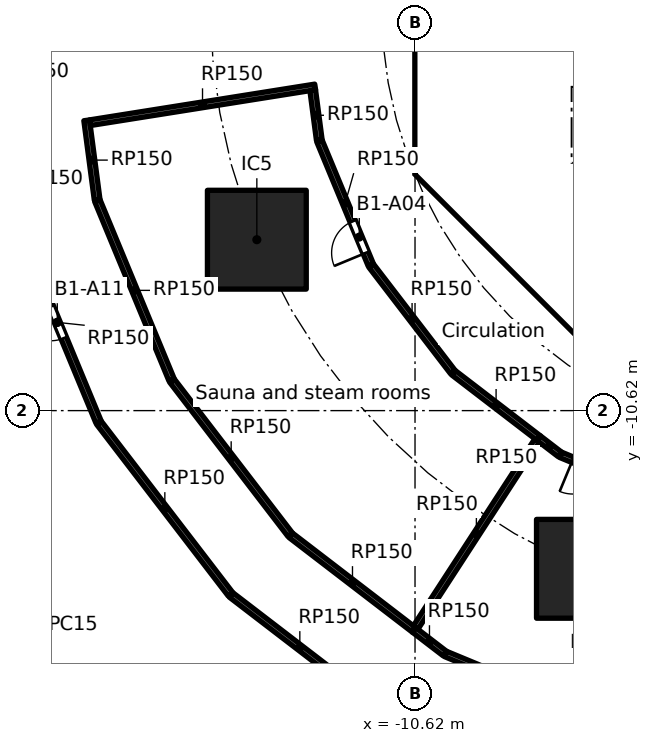
"""IFC4 building model, lengths in metres.
Left out: names, types, materials, properties, quantities, classifications, styles, units other than length and angle.
Written with IfcOpenShell. Run it as: python <this file> out.ifc"""

import sys

from ifc_helpers import new_model, si_unit, direction, frame, frame_2d, origin, origin_2d, place, context, subcontext, project, spatial, polyline, rectangle, outline, extrude, element, fill, save


model = new_model("IFC4")
c1 = context("Model", 3, precision=1e-05, world=origin(), true_north=direction((0.0, 1.0)))
c2 = subcontext(c1, "Body", "Model", "MODEL_VIEW")
j1 = project(units=[si_unit("LENGTHUNIT", "METRE"), si_unit("PLANEANGLEUNIT", "RADIAN")], contexts=[c1])
p1 = place(None, origin())
s1 = spatial("IfcSite", under=j1, at=p1, CompositionType="ELEMENT")
p2 = place(p1, origin())
s2 = spatial("IfcBuilding", under=s1, at=p2, CompositionType="ELEMENT")
p3 = place(p2, frame((0.0, 0.0, -5.0)))
s3 = spatial("IfcBuildingStorey", under=s2, at=p3, CompositionType="ELEMENT", Elevation=-5.0)
for number, where, z_axis, x_axis in (
    (1, (-14.782, -6.123, 0.0), (0.0, 0.0, 1.0), (1.0, 0.0, 0.0)),
    (2, (-6.123, -14.782, 0.0), (0.0, 0.0, 1.0), (1.0, 0.0, 0.0)),
):
    element("IfcColumn", number, at=place(p3, frame(where, z_axis=z_axis, x_axis=x_axis)), inside=s3, PredefinedType="COLUMN", context=c2, shape_type="SweptSolid", body=[
        extrude(rectangle(XDim=2.6, YDim=2.6, at=origin_2d()), origin(), (0.0, 0.0, 1.0), 5.0),
    ])
p4 = place(p3, frame((-10.325, 3.801, 0.0), z_axis=(0.0, 0.0, 1.0), x_axis=(0.0, -1.0, 0.0)))
e3 = element("IfcWall", 3, at=p4, inside=s3, PredefinedType="SHEAR", context=c2, shape_type="SweptSolid", body=[
    extrude(rectangle(XDim=7.602, YDim=0.6, at=frame_2d((3.801, 0.0))), origin(), (0.0, 0.0, 1.0), 4.6),
])
p5 = place(p4, frame((0.651, 0.0, 0.0)))
e4 = element("IfcOpeningElement", 4, at=p5, cuts=e3, PredefinedType="OPENING", context=c2, shape_type="SweptSolid", body=[
    extrude(rectangle(XDim=1.5, YDim=2.1, at=frame_2d((0.75, 1.05))), frame((0.0, 0.31, 0.0), z_axis=(0.0, -1.0, 0.0), x_axis=(1.0, 0.0, 0.0)), (0.0, 0.0, 1.0), 0.62),
])
p6 = place(p4, frame((5.451, 0.0, 0.0)))
e5 = element("IfcOpeningElement", 5, at=p6, cuts=e3, PredefinedType="OPENING", context=c2, shape_type="SweptSolid", body=[
    extrude(rectangle(XDim=1.5, YDim=2.1, at=frame_2d((0.75, 1.05))), frame((0.0, 0.31, 0.0), z_axis=(0.0, -1.0, 0.0), x_axis=(1.0, 0.0, 0.0)), (0.0, 0.0, 1.0), 0.62),
])
p7 = place(p3, frame((-9.988, -4.613, 0.0), z_axis=(0.0, 0.0, 1.0), x_axis=(0.707106781187, -0.707106781187, 0.0)))
e6 = element("IfcWall", 6, at=p7, inside=s3, PredefinedType="SHEAR", context=c2, shape_type="SweptSolid", body=[
    extrude(rectangle(XDim=7.602, YDim=0.6, at=frame_2d((3.801, 0.0))), origin(), (0.0, 0.0, 1.0), 4.6),
])
p8 = place(p7, frame((6.151, 0.0, 0.0)))
e7 = element("IfcOpeningElement", 7, at=p8, cuts=e6, PredefinedType="OPENING", context=c2, shape_type="SweptSolid", body=[
    extrude(rectangle(XDim=1.1, YDim=2.1, at=frame_2d((0.55, 1.05))), frame((0.0, 0.31, 0.0), z_axis=(0.0, -1.0, 0.0), x_axis=(1.0, 0.0, 0.0)), (0.0, 0.0, 1.0), 0.62),
])
p9 = place(p3, frame((-6.7, -2.0, 0.0), z_axis=(0.0, 0.0, 1.0), x_axis=(1.0, 0.0, 0.0)))
e8 = element("IfcWall", 8, at=p9, inside=s3, PredefinedType="SOLIDWALL", context=c2, shape_type="SweptSolid", body=[
    extrude(rectangle(XDim=13.4, YDim=0.2, at=frame_2d((6.7, 0.0))), origin(), (0.0, 0.0, 1.0), 4.6),
])
p10 = place(p9, frame((0.65, 0.0, 0.0)))
e9 = element("IfcOpeningElement", 9, at=p10, cuts=e8, PredefinedType="OPENING", context=c2, shape_type="SweptSolid", body=[
    extrude(rectangle(XDim=1.1, YDim=2.1, at=frame_2d((0.55, 1.05))), frame((0.0, 0.11, 0.0), z_axis=(0.0, -1.0, 0.0), x_axis=(1.0, 0.0, 0.0)), (0.0, 0.0, 1.0), 0.22),
])
p11 = place(p9, frame((2.85, 0.0, 0.0)))
e10 = element("IfcOpeningElement", 10, at=p11, cuts=e8, PredefinedType="OPENING", context=c2, shape_type="SweptSolid", body=[
    extrude(rectangle(XDim=1.1, YDim=2.1, at=frame_2d((0.55, 1.05))), frame((0.0, 0.11, 0.0), z_axis=(0.0, -1.0, 0.0), x_axis=(1.0, 0.0, 0.0)), (0.0, 0.0, 1.0), 0.22),
])
p12 = place(p9, frame((5.05, 0.0, 0.0)))
e11 = element("IfcOpeningElement", 11, at=p12, cuts=e8, PredefinedType="OPENING", context=c2, shape_type="SweptSolid", body=[
    extrude(rectangle(XDim=1.1, YDim=2.1, at=frame_2d((0.55, 1.05))), frame((0.0, 0.11, 0.0), z_axis=(0.0, -1.0, 0.0), x_axis=(1.0, 0.0, 0.0)), (0.0, 0.0, 1.0), 0.22),
])
p13 = place(p9, frame((7.25, 0.0, 0.0)))
e12 = element("IfcOpeningElement", 12, at=p13, cuts=e8, PredefinedType="OPENING", context=c2, shape_type="SweptSolid", body=[
    extrude(rectangle(XDim=1.1, YDim=2.1, at=frame_2d((0.55, 1.05))), frame((0.0, 0.11, 0.0), z_axis=(0.0, -1.0, 0.0), x_axis=(1.0, 0.0, 0.0)), (0.0, 0.0, 1.0), 0.22),
])
p14 = place(p9, frame((9.45, 0.0, 0.0)))
e13 = element("IfcOpeningElement", 13, at=p14, cuts=e8, PredefinedType="OPENING", context=c2, shape_type="SweptSolid", body=[
    extrude(rectangle(XDim=1.1, YDim=2.1, at=frame_2d((0.55, 1.05))), frame((0.0, 0.11, 0.0), z_axis=(0.0, -1.0, 0.0), x_axis=(1.0, 0.0, 0.0)), (0.0, 0.0, 1.0), 0.22),
])
p15 = place(p9, frame((11.65, 0.0, 0.0)))
e14 = element("IfcOpeningElement", 14, at=p15, cuts=e8, PredefinedType="OPENING", context=c2, shape_type="SweptSolid", body=[
    extrude(rectangle(XDim=1.1, YDim=2.1, at=frame_2d((0.55, 1.05))), frame((0.0, 0.11, 0.0), z_axis=(0.0, -1.0, 0.0), x_axis=(1.0, 0.0, 0.0)), (0.0, 0.0, 1.0), 0.22),
])
p16 = place(p3, origin())
e15 = element("IfcWall", 15, at=p16, inside=s3, PredefinedType="SHEAR", context=c2, shape_type="SweptSolid", body=[
    extrude(outline(polyline([(-10.625, -3.801), (-10.025, -3.801), (-10.025, -4.152), (-9.776, -4.401), (-10.2, -4.825), (-10.625, -4.401), (-10.625, -3.801)])), origin(), (0.0, 0.0, 1.0), 4.6),
])
p17 = place(p3, origin())
e16 = element("IfcWall", 16, at=p17, inside=s3, PredefinedType="SOLIDWALL", context=c2, shape_type="SweptSolid", body=[
    extrude(outline(polyline([(-6.7, -2.1), (-6.5, -2.1), (-6.5, -4.1), (-4.5, -4.1), (-4.5, -2.1), (-4.3, -2.1), (-4.3, -4.1), (-2.3, -4.1), (-2.3, -2.1), (-2.1, -2.1), (-2.1, -4.1), (-0.1, -4.1), (-0.1, -2.1), (0.1, -2.1), (0.1, -4.1), (2.1, -4.1), (2.1, -2.1), (2.3, -2.1), (2.3, -4.1), (4.3, -4.1), (4.3, -2.1), (4.5, -2.1), (4.5, -4.1), (6.5, -4.1), (6.5, -2.1), (6.7, -2.1), (6.7, -4.3), (-6.7, -4.3), (-6.7, -2.1)])), origin(), (0.0, 0.0, 1.0), 4.6),
])
p18 = place(p3, frame((-10.025, -4.0, 0.0), z_axis=(0.0, 0.0, 1.0), x_axis=(1.0, 0.0, 0.0)))
e17 = element("IfcWall", 17, at=p18, inside=s3, PredefinedType="PARTITIONING", context=c2, shape_type="SweptSolid", body=[
    extrude(rectangle(XDim=3.325, YDim=0.2, at=frame_2d((1.662, 0.0))), origin(), (0.0, 0.0, 1.0), 4.6),
])
p19 = place(p3, frame((-8.001, -6.1, 0.0), z_axis=(0.0, 0.0, 1.0), x_axis=(1.0, 0.0, 0.0)))
e18 = element("IfcWall", 18, at=p19, inside=s3, PredefinedType="PARTITIONING", context=c2, shape_type="SweptSolid", body=[
    extrude(rectangle(XDim=2.126, YDim=0.15, at=frame_2d((1.063, 0.0))), origin(), (0.0, 0.0, 1.0), 4.6),
])
p20 = place(p3, frame((-19.259, -2.982, 0.0), z_axis=(0.0, 0.0, 1.0), x_axis=(0.130625106848, -0.991431833996, 0.0)))
e19 = element("IfcWall", 19, at=p20, inside=s3, PredefinedType="PARTITIONING", context=c2, shape_type="SweptSolid", body=[
    extrude(rectangle(XDim=2.11, YDim=0.15, at=frame_2d((1.055, 0.0))), origin(), (0.0, 0.0, 1.0), 4.6),
])
p21 = place(p3, frame((-18.978, -5.097, 0.0), z_axis=(0.0, 0.0, 1.0), x_axis=(0.382672704618, -0.923883976017, 0.0)))
e20 = element("IfcWall", 20, at=p21, inside=s3, PredefinedType="PARTITIONING", context=c2, shape_type="SweptSolid", body=[
    extrude(rectangle(XDim=5.106, YDim=0.15, at=frame_2d((2.553, 0.0))), origin(), (0.0, 0.0, 1.0), 4.6),
])
p22 = place(p3, frame((-18.945, -10.924, 0.0), z_axis=(0.0, 0.0, 1.0), x_axis=(-0.38269058712, 0.923876568882, 0.0)))
e21 = element("IfcWall", 21, at=p22, inside=s3, PredefinedType="PARTITIONING", context=c2, shape_type="SweptSolid", body=[
    extrude(rectangle(XDim=5.686, YDim=0.15, at=frame_2d((2.843, 0.0))), origin(), (0.0, 0.0, 1.0), 4.6),
])
p23 = place(p22, frame((2.393, 0.0, 0.0)))
e22 = element("IfcOpeningElement", 22, at=p23, cuts=e21, PredefinedType="OPENING", context=c2, shape_type="SweptSolid", body=[
    extrude(rectangle(XDim=0.9, YDim=2.1, at=frame_2d((0.45, 1.05))), frame((0.0, 0.085, 0.0), z_axis=(0.0, -1.0, 0.0), x_axis=(1.0, 0.0, 0.0)), (0.0, 0.0, 1.0), 0.17),
])
p24 = place(p3, frame((-17.012, -9.835, 0.0), z_axis=(0.0, 0.0, 1.0), x_axis=(0.608760705644, -0.793353895348, 0.0)))
e23 = element("IfcWall", 23, at=p24, inside=s3, PredefinedType="PARTITIONING", context=c2, shape_type="SweptSolid", body=[
    extrude(rectangle(XDim=5.106, YDim=0.15, at=frame_2d((2.553, 0.0))), origin(), (0.0, 0.0, 1.0), 4.6),
])
p25 = place(p3, frame((-15.472, -15.456, 0.0), z_axis=(0.0, 0.0, 1.0), x_axis=(-0.608757822828, 0.793356107398, 0.0)))
e24 = element("IfcWall", 24, at=p25, inside=s3, PredefinedType="PARTITIONING", context=c2, shape_type="SweptSolid", body=[
    extrude(rectangle(XDim=5.686, YDim=0.15, at=frame_2d((2.843, 0.0))), origin(), (0.0, 0.0, 1.0), 4.6),
])
p26 = place(p3, frame((-13.886, -13.903, 0.0), z_axis=(0.0, 0.0, 1.0), x_axis=(0.793356294792, -0.608757578609, 0.0)))
e25 = element("IfcWall", 25, at=p26, inside=s3, PredefinedType="PARTITIONING", context=c2, shape_type="SweptSolid", body=[
    extrude(rectangle(XDim=4.087, YDim=0.15, at=frame_2d((2.043, 0.0))), origin(), (0.0, 0.0, 1.0), 4.6),
])
p27 = place(p3, frame((-13.247, -2.104, 0.0), z_axis=(0.0, 0.0, 1.0), x_axis=(-0.98762373009, -0.156841855905, 0.0)))
e26 = element("IfcWall", 26, at=p27, inside=s3, PredefinedType="PARTITIONING", context=c2, shape_type="SweptSolid", body=[
    extrude(rectangle(XDim=6.002, YDim=0.15, at=frame_2d((3.001, 0.0))), origin(), (0.0, 0.0, 1.0), 4.6),
])
p28 = place(p3, frame((-13.138, -3.508, 0.0), z_axis=(0.0, 0.0, 1.0), x_axis=(-0.130563767128, 0.991439913819, 0.0)))
e27 = element("IfcWall", 27, at=p28, inside=s3, PredefinedType="PARTITIONING", context=c2, shape_type="SweptSolid", body=[
    extrude(rectangle(XDim=1.33, YDim=0.15, at=frame_2d((0.665, 0.0))), origin(), (0.0, 0.0, 1.0), 4.6),
])
p29 = place(p3, frame((-11.846, -18.242, 0.0), z_axis=(0.0, 0.0, 1.0), x_axis=(-0.793357543816, 0.608755950829, 0.0)))
e28 = element("IfcWall", 28, at=p29, inside=s3, PredefinedType="PARTITIONING", context=c2, shape_type="SweptSolid", body=[
    extrude(rectangle(XDim=4.55, YDim=0.15, at=frame_2d((2.275, 0.0))), origin(), (0.0, 0.0, 1.0), 4.6),
])
p30 = place(p3, frame((-11.782, -6.789, 0.0), z_axis=(0.0, 0.0, 1.0), x_axis=(-0.382677866108, 0.923881838111, 0.0)))
e29 = element("IfcWall", 29, at=p30, inside=s3, PredefinedType="PARTITIONING", context=c2, shape_type="SweptSolid", body=[
    extrude(rectangle(XDim=3.527, YDim=0.15, at=frame_2d((1.763, 0.0))), origin(), (0.0, 0.0, 1.0), 4.6),
])
p31 = place(p30, frame((0.346, 0.0, 0.0)))
e30 = element("IfcOpeningElement", 30, at=p31, cuts=e29, PredefinedType="OPENING", context=c2, shape_type="SweptSolid", body=[
    extrude(rectangle(XDim=0.9, YDim=2.1, at=frame_2d((0.45, 1.05))), frame((0.0, 0.085, 0.0), z_axis=(0.0, -1.0, 0.0), x_axis=(1.0, 0.0, 0.0)), (0.0, 0.0, 1.0), 0.17),
])
p32 = place(p3, frame((-10.644, -16.391, 0.0), z_axis=(0.0, 0.0, 1.0), x_axis=(0.793344280216, -0.608773236147, 0.0)))
e31 = element("IfcWall", 31, at=p32, inside=s3, PredefinedType="PARTITIONING", context=c2, shape_type="SweptSolid", body=[
    extrude(rectangle(XDim=1.02, YDim=0.15, at=frame_2d((0.51, 0.0))), origin(), (0.0, 0.0, 1.0), 4.6),
])
p33 = place(p3, frame((-9.815, -17.023, 0.0), z_axis=(0.0, 0.0, 1.0), x_axis=(0.923883976017, -0.382672704618, 0.0)))
e32 = element("IfcWall", 32, at=p33, inside=s3, PredefinedType="PARTITIONING", context=c2, shape_type="SweptSolid", body=[
    extrude(rectangle(XDim=5.106, YDim=0.15, at=frame_2d((2.553, 0.0))), origin(), (0.0, 0.0, 1.0), 4.6),
])
p34 = place(p3, frame((-9.624, -9.607, 0.0), z_axis=(0.0, 0.0, 1.0), x_axis=(-0.608736710054, 0.793372307201, 0.0)))
e33 = element("IfcWall", 33, at=p34, inside=s3, PredefinedType="PARTITIONING", context=c2, shape_type="SweptSolid", body=[
    extrude(rectangle(XDim=3.527, YDim=0.15, at=frame_2d((1.763, 0.0))), origin(), (0.0, 0.0, 1.0), 4.6),
])
p35 = place(p3, frame((-7.407, -11.406, 0.0), z_axis=(0.0, 0.0, 1.0), x_axis=(-0.544646109016, -0.838665973993, 0.0)))
e34 = element("IfcWall", 34, at=p35, inside=s3, PredefinedType="PARTITIONING", context=c2, shape_type="SweptSolid", body=[
    extrude(rectangle(XDim=5.868, YDim=0.15, at=frame_2d((2.934, 0.0))), origin(), (0.0, 0.0, 1.0), 4.6),
])
p36 = place(p3, frame((-7.366, -11.343, 0.0), z_axis=(0.0, 0.0, 1.0), x_axis=(-0.793375345407, 0.608732750311, 0.0)))
e35 = element("IfcWall", 35, at=p36, inside=s3, PredefinedType="PARTITIONING", context=c2, shape_type="SweptSolid", body=[
    extrude(rectangle(XDim=2.824, YDim=0.15, at=frame_2d((1.412, 0.0))), origin(), (0.0, 0.0, 1.0), 4.6),
])
p37 = place(p3, frame((-6.809, -11.771, 0.0), z_axis=(0.0, 0.0, 1.0), x_axis=(-0.793360087844, 0.608752635326, 0.0)))
e36 = element("IfcWall", 36, at=p37, inside=s3, PredefinedType="PARTITIONING", context=c2, shape_type="SweptSolid", body=[
    extrude(rectangle(XDim=0.702, YDim=0.15, at=frame_2d((0.351, 0.0))), origin(), (0.0, 0.0, 1.0), 4.6),
])
p38 = place(p3, frame((-3.531, -13.132, 0.0), z_axis=(0.0, 0.0, 1.0), x_axis=(-0.923881838111, 0.382677866108, 0.0)))
e37 = element("IfcWall", 37, at=p38, inside=s3, PredefinedType="PARTITIONING", context=c2, shape_type="SweptSolid", body=[
    extrude(rectangle(XDim=3.527, YDim=0.15, at=frame_2d((1.763, 0.0))), origin(), (0.0, 0.0, 1.0), 4.6),
])
p39 = place(p38, frame((2.281, 0.0, 0.0)))
e38 = element("IfcOpeningElement", 38, at=p39, cuts=e37, PredefinedType="OPENING", context=c2, shape_type="SweptSolid", body=[
    extrude(rectangle(XDim=0.9, YDim=2.1, at=frame_2d((0.45, 1.05))), frame((0.0, 0.085, 0.0), z_axis=(0.0, -1.0, 0.0), x_axis=(1.0, 0.0, 0.0)), (0.0, 0.0, 1.0), 0.17),
])
p40 = place(p6, origin())
e39 = element("IfcDoor", 39, at=p40, inside=s3, OperationType="DOUBLE_DOOR_SINGLE_SWING", PredefinedType="DOOR", context=c2, shape_type="SweptSolid", body=[
    extrude(rectangle(XDim=1.5, YDim=2.1, at=frame_2d((0.75, 1.05))), frame((0.0, 0.025, 0.0), z_axis=(0.0, -1.0, 0.0), x_axis=(1.0, 0.0, 0.0)), (0.0, 0.0, 1.0), 0.05),
])
fill(e5, e39)
p41 = place(p31, origin())
e40 = element("IfcDoor", 40, at=p41, inside=s3, OperationType="SINGLE_SWING_LEFT", PredefinedType="DOOR", context=c2, shape_type="SweptSolid", body=[
    extrude(rectangle(XDim=0.9, YDim=2.1, at=frame_2d((0.45, 1.05))), frame((0.0, 0.025, 0.0), z_axis=(0.0, -1.0, 0.0), x_axis=(1.0, 0.0, 0.0)), (0.0, 0.0, 1.0), 0.05),
])
fill(e30, e40)
p42 = place(p39, origin())
e41 = element("IfcDoor", 41, at=p42, inside=s3, OperationType="SINGLE_SWING_RIGHT", PredefinedType="DOOR", context=c2, shape_type="SweptSolid", body=[
    extrude(rectangle(XDim=0.9, YDim=2.1, at=frame_2d((0.45, 1.05))), frame((0.0, 0.025, 0.0), z_axis=(0.0, -1.0, 0.0), x_axis=(1.0, 0.0, 0.0)), (0.0, 0.0, 1.0), 0.05),
])
fill(e38, e41)
p43 = place(p23, origin())
e42 = element("IfcDoor", 42, at=p43, inside=s3, OperationType="SINGLE_SWING_RIGHT", PredefinedType="DOOR", context=c2, shape_type="SweptSolid", body=[
    extrude(rectangle(XDim=0.9, YDim=2.1, at=frame_2d((0.45, 1.05))), frame((0.0, 0.025, 0.0), z_axis=(0.0, -1.0, 0.0), x_axis=(1.0, 0.0, 0.0)), (0.0, 0.0, 1.0), 0.05),
])
fill(e22, e42)
save(model, sys.argv[1])
